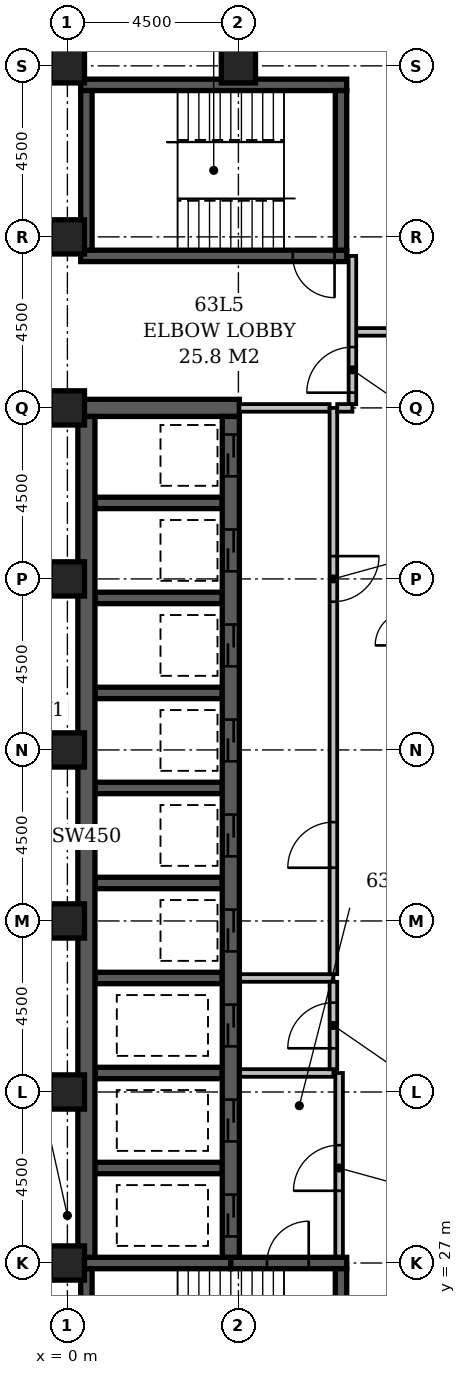
"""IFC4 building model, lengths in metres.
Left out: names, types, materials, properties, quantities, classifications, styles, units other than length and angle.
Written with IfcOpenShell. Run it as: python <this file> out.ifc"""

import sys

from ifc_helpers import new_model, si_unit, direction, frame, frame_2d, origin, origin_2d, place, context, subcontext, project, spatial, rectangle, extrude, element, fill, save


model = new_model("IFC4")
c1 = context("Model", 3, precision=1e-05, world=origin(), true_north=direction((0.0, 1.0)))
c2 = subcontext(c1, "Body", "Model", "MODEL_VIEW")
j1 = project(units=[si_unit("LENGTHUNIT", "METRE"), si_unit("PLANEANGLEUNIT", "RADIAN")], contexts=[c1])
p1 = place(None, origin())
s1 = spatial("IfcSite", under=j1, at=p1, CompositionType="ELEMENT")
p2 = place(p1, origin())
s2 = spatial("IfcBuilding", under=s1, at=p2, CompositionType="ELEMENT")
p3 = place(p2, frame((0.0, 0.0, 243.8)))
s3 = spatial("IfcBuildingStorey", under=s2, at=p3, CompositionType="ELEMENT", Elevation=243.8)
p4 = place(p3, frame((0.275, 49.5, -0.3), z_axis=(0.0, 0.0, 1.0), x_axis=(1.0, 0.0, 0.0)))
e1 = element("IfcWall", 1, at=p4, inside=s3, PredefinedType="SHEAR", context=c2, shape_type="SweptSolid", body=[
    extrude(rectangle(XDim=4.25, YDim=0.45, at=frame_2d((2.125, 0.0))), origin(), (0.0, 0.0, 1.0), 3.6),
])
p5 = place(p3, frame((0.35, 27.0, -0.3), z_axis=(0.0, 0.0, 1.0), x_axis=(1.0, 0.0, 0.0)))
e2 = element("IfcWall", 2, at=p5, inside=s3, PredefinedType="SHEAR", context=c2, shape_type="SweptSolid", body=[
    extrude(rectangle(XDim=3.95, YDim=0.3, at=frame_2d((1.975, 0.0))), origin(), (0.0, 0.0, 1.0), 3.6),
])
p6 = place(p3, frame((0.35, 53.5, -0.3), z_axis=(0.0, 0.0, 1.0), x_axis=(1.0, 0.0, 0.0)))
e3 = element("IfcWall", 3, at=p6, inside=s3, PredefinedType="SHEAR", context=c2, shape_type="SweptSolid", body=[
    extrude(rectangle(XDim=7.0, YDim=0.3, at=frame_2d((3.5, 0.0))), origin(), (0.0, 0.0, 1.0), 3.6),
])
p7 = place(p6, frame((5.58, 0.0, 0.3)))
e4 = element("IfcOpeningElement", 4, at=p7, cuts=e3, PredefinedType="OPENING", context=c2, shape_type="SweptSolid", body=[
    extrude(rectangle(XDim=1.1, YDim=2.1, at=frame_2d((0.55, 1.05))), frame((0.0, 0.162, 0.0), z_axis=(0.0, -1.0, 0.0), x_axis=(1.0, 0.0, 0.0)), (0.0, 0.0, 1.0), 0.324),
])
p8 = place(p3, frame((0.35, 58.0, -0.3), z_axis=(0.0, 0.0, 1.0), x_axis=(1.0, 0.0, 0.0)))
e5 = element("IfcWall", 5, at=p8, inside=s3, PredefinedType="SHEAR", context=c2, shape_type="SweptSolid", body=[
    extrude(rectangle(XDim=7.0, YDim=0.3, at=frame_2d((3.5, 0.0))), origin(), (0.0, 0.0, 1.0), 3.6),
])
p9 = place(p3, frame((0.5, 22.65, -0.3), z_axis=(0.0, 0.0, 1.0), x_axis=(0.0, 1.0, 0.0)))
e6 = element("IfcWall", 6, at=p9, inside=s3, PredefinedType="SHEAR", context=c2, shape_type="SweptSolid", body=[
    extrude(rectangle(XDim=4.2, YDim=0.3, at=frame_2d((2.1, 0.0))), origin(), (0.0, 0.0, 1.0), 3.6),
])
p10 = place(p3, frame((0.5, 27.15, -0.3), z_axis=(0.0, 0.0, 1.0), x_axis=(0.0, 1.0, 0.0)))
e7 = element("IfcWall", 7, at=p10, inside=s3, PredefinedType="SHEAR", context=c2, shape_type="SweptSolid", body=[
    extrude(rectangle(XDim=22.125, YDim=0.45, at=frame_2d((11.062, 0.0))), origin(), (0.0, 0.0, 1.0), 3.6),
])
p11 = place(p3, frame((0.5, 53.65, -0.3), z_axis=(0.0, 0.0, 1.0), x_axis=(0.0, 1.0, 0.0)))
e8 = element("IfcWall", 8, at=p11, inside=s3, PredefinedType="SHEAR", context=c2, shape_type="SweptSolid", body=[
    extrude(rectangle(XDim=4.2, YDim=0.3, at=frame_2d((2.1, 0.0))), origin(), (0.0, 0.0, 1.0), 3.6),
])
for number, where, z_axis, x_axis in (
    (9, (0.725, 29.5, -0.3), (0.0, 0.0, 1.0), (1.0, 0.0, 0.0)),
    (10, (0.725, 32.0, -0.3), (0.0, 0.0, 1.0), (1.0, 0.0, 0.0)),
    (11, (0.725, 34.5, -0.3), (0.0, 0.0, 1.0), (1.0, 0.0, 0.0)),
    (12, (0.725, 37.0, -0.3), (0.0, 0.0, 1.0), (1.0, 0.0, 0.0)),
    (13, (0.725, 39.5, -0.3), (0.0, 0.0, 1.0), (1.0, 0.0, 0.0)),
    (14, (0.725, 42.0, -0.3), (0.0, 0.0, 1.0), (1.0, 0.0, 0.0)),
    (15, (0.725, 44.5, -0.3), (0.0, 0.0, 1.0), (1.0, 0.0, 0.0)),
    (16, (0.725, 47.0, -0.3), (0.0, 0.0, 1.0), (1.0, 0.0, 0.0)),
):
    element("IfcWall", number, at=place(p3, frame(where, z_axis=z_axis, x_axis=x_axis)), inside=s3, PredefinedType="SHEAR", context=c2, shape_type="SweptSolid", body=[
        extrude(rectangle(XDim=3.35, YDim=0.3, at=frame_2d((1.675, 0.0))), origin(), (0.0, 0.0, 1.0), 3.6),
    ])
p12 = place(p3, frame((4.3, 27.0, -0.3), z_axis=(0.0, 0.0, 1.0), x_axis=(1.0, 0.0, 0.0)))
e17 = element("IfcWall", 17, at=p12, inside=s3, PredefinedType="SHEAR", context=c2, shape_type="SweptSolid", body=[
    extrude(rectangle(XDim=3.05, YDim=0.3, at=frame_2d((1.525, 0.0))), origin(), (0.0, 0.0, 1.0), 3.6),
])
p13 = place(p12, frame((0.95, 0.0, 0.3)))
e18 = element("IfcOpeningElement", 18, at=p13, cuts=e17, PredefinedType="OPENING", context=c2, shape_type="SweptSolid", body=[
    extrude(rectangle(XDim=1.1, YDim=2.1, at=frame_2d((0.55, 1.05))), frame((0.0, 0.162, 0.0), z_axis=(0.0, -1.0, 0.0), x_axis=(1.0, 0.0, 0.0)), (0.0, 0.0, 1.0), 0.324),
])
p14 = place(p3, frame((4.3, 27.15, -0.3), z_axis=(0.0, 0.0, 1.0), x_axis=(0.0, 1.0, 0.0)))
e19 = element("IfcWall", 19, at=p14, inside=s3, PredefinedType="SHEAR", context=c2, shape_type="SweptSolid", body=[
    extrude(rectangle(XDim=22.125, YDim=0.45, at=frame_2d((11.062, 0.0))), origin(), (0.0, 0.0, 1.0), 3.6),
])
p15 = place(p14, frame((3.05, 0.0, 0.3)))
e20 = element("IfcOpeningElement", 20, at=p15, cuts=e19, PredefinedType="OPENING", context=c2, shape_type="SweptSolid", body=[
    extrude(rectangle(XDim=1.1, YDim=2.1, at=frame_2d((0.55, 1.05))), frame((0.0, 0.237, 0.0), z_axis=(0.0, -1.0, 0.0), x_axis=(1.0, 0.0, 0.0)), (0.0, 0.0, 1.0), 0.474),
])
p16 = place(p14, frame((0.55, 0.0, 0.3)))
e21 = element("IfcOpeningElement", 21, at=p16, cuts=e19, PredefinedType="OPENING", context=c2, shape_type="SweptSolid", body=[
    extrude(rectangle(XDim=1.1, YDim=2.1, at=frame_2d((0.55, 1.05))), frame((0.0, 0.237, 0.0), z_axis=(0.0, -1.0, 0.0), x_axis=(1.0, 0.0, 0.0)), (0.0, 0.0, 1.0), 0.474),
])
p17 = place(p14, frame((20.55, 0.0, 0.3)))
e22 = element("IfcOpeningElement", 22, at=p17, cuts=e19, PredefinedType="OPENING", context=c2, shape_type="SweptSolid", body=[
    extrude(rectangle(XDim=1.1, YDim=2.1, at=frame_2d((0.55, 1.05))), frame((0.0, 0.237, 0.0), z_axis=(0.0, -1.0, 0.0), x_axis=(1.0, 0.0, 0.0)), (0.0, 0.0, 1.0), 0.474),
])
p18 = place(p14, frame((18.05, 0.0, 0.3)))
e23 = element("IfcOpeningElement", 23, at=p18, cuts=e19, PredefinedType="OPENING", context=c2, shape_type="SweptSolid", body=[
    extrude(rectangle(XDim=1.1, YDim=2.1, at=frame_2d((0.55, 1.05))), frame((0.0, 0.237, 0.0), z_axis=(0.0, -1.0, 0.0), x_axis=(1.0, 0.0, 0.0)), (0.0, 0.0, 1.0), 0.474),
])
p19 = place(p14, frame((15.55, 0.0, 0.3)))
e24 = element("IfcOpeningElement", 24, at=p19, cuts=e19, PredefinedType="OPENING", context=c2, shape_type="SweptSolid", body=[
    extrude(rectangle(XDim=1.1, YDim=2.1, at=frame_2d((0.55, 1.05))), frame((0.0, 0.237, 0.0), z_axis=(0.0, -1.0, 0.0), x_axis=(1.0, 0.0, 0.0)), (0.0, 0.0, 1.0), 0.474),
])
p20 = place(p14, frame((13.05, 0.0, 0.3)))
e25 = element("IfcOpeningElement", 25, at=p20, cuts=e19, PredefinedType="OPENING", context=c2, shape_type="SweptSolid", body=[
    extrude(rectangle(XDim=1.1, YDim=2.1, at=frame_2d((0.55, 1.05))), frame((0.0, 0.237, 0.0), z_axis=(0.0, -1.0, 0.0), x_axis=(1.0, 0.0, 0.0)), (0.0, 0.0, 1.0), 0.474),
])
p21 = place(p14, frame((10.55, 0.0, 0.3)))
e26 = element("IfcOpeningElement", 26, at=p21, cuts=e19, PredefinedType="OPENING", context=c2, shape_type="SweptSolid", body=[
    extrude(rectangle(XDim=1.1, YDim=2.1, at=frame_2d((0.55, 1.05))), frame((0.0, 0.237, 0.0), z_axis=(0.0, -1.0, 0.0), x_axis=(1.0, 0.0, 0.0)), (0.0, 0.0, 1.0), 0.474),
])
p22 = place(p14, frame((8.05, 0.0, 0.3)))
e27 = element("IfcOpeningElement", 27, at=p22, cuts=e19, PredefinedType="OPENING", context=c2, shape_type="SweptSolid", body=[
    extrude(rectangle(XDim=1.1, YDim=2.1, at=frame_2d((0.55, 1.05))), frame((0.0, 0.237, 0.0), z_axis=(0.0, -1.0, 0.0), x_axis=(1.0, 0.0, 0.0)), (0.0, 0.0, 1.0), 0.474),
])
p23 = place(p14, frame((5.55, 0.0, 0.3)))
e28 = element("IfcOpeningElement", 28, at=p23, cuts=e19, PredefinedType="OPENING", context=c2, shape_type="SweptSolid", body=[
    extrude(rectangle(XDim=1.1, YDim=2.1, at=frame_2d((0.55, 1.05))), frame((0.0, 0.237, 0.0), z_axis=(0.0, -1.0, 0.0), x_axis=(1.0, 0.0, 0.0)), (0.0, 0.0, 1.0), 0.474),
])
p24 = place(p3, frame((7.2, 22.65, -0.3), z_axis=(0.0, 0.0, 1.0), x_axis=(0.0, 1.0, 0.0)))
e29 = element("IfcWall", 29, at=p24, inside=s3, PredefinedType="SHEAR", context=c2, shape_type="SweptSolid", body=[
    extrude(rectangle(XDim=4.2, YDim=0.3, at=frame_2d((2.1, 0.0))), origin(), (0.0, 0.0, 1.0), 3.6),
])
p25 = place(p24, frame((0.8, 0.0, 0.3)))
e30 = element("IfcOpeningElement", 30, at=p25, cuts=e29, PredefinedType="OPENING", context=c2, shape_type="SweptSolid", body=[
    extrude(rectangle(XDim=1.1, YDim=2.1, at=frame_2d((0.55, 1.05))), frame((0.0, 0.162, 0.0), z_axis=(0.0, -1.0, 0.0), x_axis=(1.0, 0.0, 0.0)), (0.0, 0.0, 1.0), 0.324),
])
p26 = place(p3, frame((7.2, 53.65, -0.3), z_axis=(0.0, 0.0, 1.0), x_axis=(0.0, 1.0, 0.0)))
e31 = element("IfcWall", 31, at=p26, inside=s3, PredefinedType="SHEAR", context=c2, shape_type="SweptSolid", body=[
    extrude(rectangle(XDim=4.2, YDim=0.3, at=frame_2d((2.1, 0.0))), origin(), (0.0, 0.0, 1.0), 3.6),
])
for number, where, z_axis, x_axis in (
    (32, (0.0, 27.0, -0.3), (0.0, 0.0, 1.0), (1.0, 0.0, 0.0)),
    (33, (0.0, 31.5, -0.3), (0.0, 0.0, 1.0), (1.0, 0.0, 0.0)),
    (34, (0.0, 36.0, -0.3), (0.0, 0.0, 1.0), (1.0, 0.0, 0.0)),
    (35, (0.0, 40.5, -0.3), (0.0, 0.0, 1.0), (1.0, 0.0, 0.0)),
    (36, (0.0, 45.0, -0.3), (0.0, 0.0, 1.0), (1.0, 0.0, 0.0)),
    (37, (0.0, 49.5, -0.3), (0.0, 0.0, 1.0), (1.0, 0.0, 0.0)),
    (38, (0.0, 54.0, -0.3), (0.0, 0.0, 1.0), (1.0, 0.0, 0.0)),
    (39, (0.0, 58.5, -0.3), (0.0, 0.0, 1.0), (1.0, 0.0, 0.0)),
    (40, (4.5, 58.5, -0.3), (0.0, 0.0, 1.0), (1.0, 0.0, 0.0)),
):
    element("IfcColumn", number, at=place(p3, frame(where, z_axis=z_axis, x_axis=x_axis)), inside=s3, PredefinedType="COLUMN", context=c2, shape_type="SweptSolid", body=[
        extrude(rectangle(XDim=0.9, YDim=0.9, at=origin_2d()), origin(), (0.0, 0.0, 1.0), 3.6),
    ])
p27 = place(p3, frame((4.545, 34.5, 0.0), z_axis=(0.0, 0.0, 1.0), x_axis=(1.0, 0.0, 0.0)))
e41 = element("IfcWall", 41, at=p27, inside=s3, PredefinedType="PARTITIONING", context=c2, shape_type="SweptSolid", body=[
    extrude(rectangle(XDim=2.455, YDim=0.2, at=frame_2d((1.228, 0.0))), origin(), (0.0, 0.0, 1.0), 3.3),
])
p28 = place(p3, frame((7.0, 34.6, 0.0), z_axis=(0.0, 0.0, 1.0), x_axis=(0.0, 1.0, 0.0)))
e42 = element("IfcWall", 42, at=p28, inside=s3, PredefinedType="PARTITIONING", context=c2, shape_type="SweptSolid", body=[
    extrude(rectangle(XDim=14.9, YDim=0.2, at=frame_2d((7.45, 0.0))), origin(), (0.0, 0.0, 1.0), 3.3),
])
p29 = place(p28, frame((2.8, 0.0, 0.0)))
e43 = element("IfcOpeningElement", 43, at=p29, cuts=e42, PredefinedType="OPENING", context=c2, shape_type="SweptSolid", body=[
    extrude(rectangle(XDim=1.2, YDim=2.1, at=frame_2d((0.6, 1.05))), frame((0.0, 0.112, 0.0), z_axis=(0.0, -1.0, 0.0), x_axis=(1.0, 0.0, 0.0)), (0.0, 0.0, 1.0), 0.224),
])
p30 = place(p28, frame((9.8, 0.0, 0.0)))
e44 = element("IfcOpeningElement", 44, at=p30, cuts=e42, PredefinedType="OPENING", context=c2, shape_type="SweptSolid", body=[
    extrude(rectangle(XDim=1.2, YDim=2.1, at=frame_2d((0.6, 1.05))), frame((0.0, 0.112, 0.0), z_axis=(0.0, -1.0, 0.0), x_axis=(1.0, 0.0, 0.0)), (0.0, 0.0, 1.0), 0.224),
])
p31 = place(p3, frame((4.525, 49.5, 0.0), z_axis=(0.0, 0.0, 1.0), x_axis=(1.0, 0.0, 0.0)))
e45 = element("IfcWall", 45, at=p31, inside=s3, PredefinedType="PARTITIONING", context=c2, shape_type="SweptSolid", body=[
    extrude(rectangle(XDim=2.375, YDim=0.2, at=frame_2d((1.188, 0.0))), origin(), (0.0, 0.0, 1.0), 3.3),
])
p32 = place(p3, frame((4.545, 32.0, 0.0), z_axis=(0.0, 0.0, 1.0), x_axis=(1.0, 0.0, 0.0)))
e46 = element("IfcWall", 46, at=p32, inside=s3, PredefinedType="PARTITIONING", context=c2, shape_type="SweptSolid", body=[
    extrude(rectangle(XDim=2.455, YDim=0.2, at=frame_2d((1.228, 0.0))), origin(), (0.0, 0.0, 1.0), 3.3),
])
p33 = place(p3, frame((7.0, 32.1, 0.0), z_axis=(0.0, 0.0, 1.0), x_axis=(0.0, 1.0, 0.0)))
e47 = element("IfcWall", 47, at=p33, inside=s3, PredefinedType="PARTITIONING", context=c2, shape_type="SweptSolid", body=[
    extrude(rectangle(XDim=2.3, YDim=0.2, at=frame_2d((1.15, 0.0))), origin(), (0.0, 0.0, 1.0), 3.3),
])
p34 = place(p33, frame((0.55, 0.0, 0.0)))
e48 = element("IfcOpeningElement", 48, at=p34, cuts=e47, PredefinedType="OPENING", context=c2, shape_type="SweptSolid", body=[
    extrude(rectangle(XDim=1.2, YDim=2.1, at=frame_2d((0.6, 1.05))), frame((0.0, 0.112, 0.0), z_axis=(0.0, -1.0, 0.0), x_axis=(1.0, 0.0, 0.0)), (0.0, 0.0, 1.0), 0.224),
])
p35 = place(p3, frame((7.15, 27.17, 0.0), z_axis=(0.0, 0.0, 1.0), x_axis=(0.0, 1.0, 0.0)))
e49 = element("IfcWall", 49, at=p35, inside=s3, PredefinedType="PARTITIONING", context=c2, shape_type="SweptSolid", body=[
    extrude(rectangle(XDim=4.83, YDim=0.2, at=frame_2d((2.415, 0.0))), origin(), (0.0, 0.0, 1.0), 3.3),
])
p36 = place(p35, frame((1.73, 0.0, 0.0)))
e50 = element("IfcOpeningElement", 50, at=p36, cuts=e49, PredefinedType="OPENING", context=c2, shape_type="SweptSolid", body=[
    extrude(rectangle(XDim=1.2, YDim=2.1, at=frame_2d((0.6, 1.05))), frame((0.0, 0.112, 0.0), z_axis=(0.0, -1.0, 0.0), x_axis=(1.0, 0.0, 0.0)), (0.0, 0.0, 1.0), 0.224),
])
p37 = place(p3, frame((7.1, 49.5, 0.0), z_axis=(0.0, 0.0, 1.0), x_axis=(1.0, 0.0, 0.0)))
e51 = element("IfcWall", 51, at=p37, inside=s3, PredefinedType="PARTITIONING", context=c2, shape_type="SweptSolid", body=[
    extrude(rectangle(XDim=0.4, YDim=0.2, at=frame_2d((0.2, 0.0))), origin(), (0.0, 0.0, 1.0), 3.3),
])
p38 = place(p3, frame((7.5, 49.6, 0.0), z_axis=(0.0, 0.0, 1.0), x_axis=(0.0, 1.0, 0.0)))
e52 = element("IfcWall", 52, at=p38, inside=s3, PredefinedType="PARTITIONING", context=c2, shape_type="SweptSolid", body=[
    extrude(rectangle(XDim=3.9, YDim=0.2, at=frame_2d((1.95, 0.0))), origin(), (0.0, 0.0, 1.0), 3.3),
])
p39 = place(p38, frame((0.3, 0.0, 0.0)))
e53 = element("IfcOpeningElement", 53, at=p39, cuts=e52, PredefinedType="OPENING", context=c2, shape_type="SweptSolid", body=[
    extrude(rectangle(XDim=1.2, YDim=2.1, at=frame_2d((0.6, 1.05))), frame((0.0, 0.112, 0.0), z_axis=(0.0, -1.0, 0.0), x_axis=(1.0, 0.0, 0.0)), (0.0, 0.0, 1.0), 0.224),
])
p40 = place(p3, frame((7.6, 51.5, 0.0), z_axis=(0.0, 0.0, 1.0), x_axis=(1.0, 0.0, 0.0)))
e54 = element("IfcWall", 54, at=p40, inside=s3, PredefinedType="PARTITIONING", context=c2, shape_type="SweptSolid", body=[
    extrude(rectangle(XDim=14.65, YDim=0.2, at=frame_2d((7.325, 0.0))), origin(), (0.0, 0.0, 1.0), 3.3),
])
p41 = place(p40, frame((3.4, 0.0, 0.0)))
e55 = element("IfcOpeningElement", 55, at=p41, cuts=e54, PredefinedType="OPENING", context=c2, shape_type="SweptSolid", body=[
    extrude(rectangle(XDim=1.2, YDim=2.1, at=frame_2d((0.6, 1.05))), frame((0.0, 0.112, 0.0), z_axis=(0.0, -1.0, 0.0), x_axis=(1.0, 0.0, 0.0)), (0.0, 0.0, 1.0), 0.224),
])
p42 = place(p40, frame((10.925, 0.0, 0.0)))
e56 = element("IfcOpeningElement", 56, at=p42, cuts=e54, PredefinedType="OPENING", context=c2, shape_type="SweptSolid", body=[
    extrude(rectangle(XDim=1.0, YDim=2.1, at=frame_2d((0.5, 1.05))), frame((0.0, 0.112, 0.0), z_axis=(0.0, -1.0, 0.0), x_axis=(1.0, 0.0, 0.0)), (0.0, 0.0, 1.0), 0.224),
])
p43 = place(p39, origin())
e57 = element("IfcDoor", 57, at=p43, inside=s3, OperationType="SINGLE_SWING_LEFT", PredefinedType="DOOR", context=c2, shape_type="SweptSolid", body=[
    extrude(rectangle(XDim=1.2, YDim=2.1, at=frame_2d((0.6, 1.05))), frame((0.0, 0.025, 0.0), z_axis=(0.0, -1.0, 0.0), x_axis=(1.0, 0.0, 0.0)), (0.0, 0.0, 1.0), 0.05),
])
fill(e53, e57)
p44 = place(p36, origin())
e58 = element("IfcDoor", 58, at=p44, inside=s3, OperationType="SINGLE_SWING_LEFT", PredefinedType="DOOR", context=c2, shape_type="SweptSolid", body=[
    extrude(rectangle(XDim=1.2, YDim=2.1, at=frame_2d((0.6, 1.05))), frame((0.0, 0.025, 0.0), z_axis=(0.0, -1.0, 0.0), x_axis=(1.0, 0.0, 0.0)), (0.0, 0.0, 1.0), 0.05),
])
fill(e50, e58)
p45 = place(p15, origin())
e59 = element("IfcDoor", 59, at=p45, inside=s3, OperationType="SLIDING_TO_LEFT", PredefinedType="DOOR", context=c2, shape_type="SweptSolid", body=[
    extrude(rectangle(XDim=1.1, YDim=2.1, at=frame_2d((0.55, 1.05))), frame((0.0, 0.025, 0.0), z_axis=(0.0, -1.0, 0.0), x_axis=(1.0, 0.0, 0.0)), (0.0, 0.0, 1.0), 0.05),
])
fill(e20, e59)
p46 = place(p16, origin())
e60 = element("IfcDoor", 60, at=p46, inside=s3, OperationType="SLIDING_TO_LEFT", PredefinedType="DOOR", context=c2, shape_type="SweptSolid", body=[
    extrude(rectangle(XDim=1.1, YDim=2.1, at=frame_2d((0.55, 1.05))), frame((0.0, 0.025, 0.0), z_axis=(0.0, -1.0, 0.0), x_axis=(1.0, 0.0, 0.0)), (0.0, 0.0, 1.0), 0.05),
])
fill(e21, e60)
p47 = place(p17, origin())
e61 = element("IfcDoor", 61, at=p47, inside=s3, OperationType="SLIDING_TO_LEFT", PredefinedType="DOOR", context=c2, shape_type="SweptSolid", body=[
    extrude(rectangle(XDim=1.1, YDim=2.1, at=frame_2d((0.55, 1.05))), frame((0.0, 0.025, 0.0), z_axis=(0.0, -1.0, 0.0), x_axis=(1.0, 0.0, 0.0)), (0.0, 0.0, 1.0), 0.05),
])
fill(e22, e61)
p48 = place(p18, origin())
e62 = element("IfcDoor", 62, at=p48, inside=s3, OperationType="SLIDING_TO_LEFT", PredefinedType="DOOR", context=c2, shape_type="SweptSolid", body=[
    extrude(rectangle(XDim=1.1, YDim=2.1, at=frame_2d((0.55, 1.05))), frame((0.0, 0.025, 0.0), z_axis=(0.0, -1.0, 0.0), x_axis=(1.0, 0.0, 0.0)), (0.0, 0.0, 1.0), 0.05),
])
fill(e23, e62)
p49 = place(p19, origin())
e63 = element("IfcDoor", 63, at=p49, inside=s3, OperationType="SLIDING_TO_LEFT", PredefinedType="DOOR", context=c2, shape_type="SweptSolid", body=[
    extrude(rectangle(XDim=1.1, YDim=2.1, at=frame_2d((0.55, 1.05))), frame((0.0, 0.025, 0.0), z_axis=(0.0, -1.0, 0.0), x_axis=(1.0, 0.0, 0.0)), (0.0, 0.0, 1.0), 0.05),
])
fill(e24, e63)
p50 = place(p20, origin())
e64 = element("IfcDoor", 64, at=p50, inside=s3, OperationType="SLIDING_TO_LEFT", PredefinedType="DOOR", context=c2, shape_type="SweptSolid", body=[
    extrude(rectangle(XDim=1.1, YDim=2.1, at=frame_2d((0.55, 1.05))), frame((0.0, 0.025, 0.0), z_axis=(0.0, -1.0, 0.0), x_axis=(1.0, 0.0, 0.0)), (0.0, 0.0, 1.0), 0.05),
])
fill(e25, e64)
p51 = place(p21, origin())
e65 = element("IfcDoor", 65, at=p51, inside=s3, OperationType="SLIDING_TO_LEFT", PredefinedType="DOOR", context=c2, shape_type="SweptSolid", body=[
    extrude(rectangle(XDim=1.1, YDim=2.1, at=frame_2d((0.55, 1.05))), frame((0.0, 0.025, 0.0), z_axis=(0.0, -1.0, 0.0), x_axis=(1.0, 0.0, 0.0)), (0.0, 0.0, 1.0), 0.05),
])
fill(e26, e65)
p52 = place(p22, origin())
e66 = element("IfcDoor", 66, at=p52, inside=s3, OperationType="SLIDING_TO_LEFT", PredefinedType="DOOR", context=c2, shape_type="SweptSolid", body=[
    extrude(rectangle(XDim=1.1, YDim=2.1, at=frame_2d((0.55, 1.05))), frame((0.0, 0.025, 0.0), z_axis=(0.0, -1.0, 0.0), x_axis=(1.0, 0.0, 0.0)), (0.0, 0.0, 1.0), 0.05),
])
fill(e27, e66)
p53 = place(p29, origin())
e67 = element("IfcDoor", 67, at=p53, inside=s3, OperationType="SINGLE_SWING_LEFT", PredefinedType="DOOR", context=c2, shape_type="SweptSolid", body=[
    extrude(rectangle(XDim=1.2, YDim=2.1, at=frame_2d((0.6, 1.05))), frame((0.0, 0.025, 0.0), z_axis=(0.0, -1.0, 0.0), x_axis=(1.0, 0.0, 0.0)), (0.0, 0.0, 1.0), 0.05),
])
fill(e43, e67)
p54 = place(p30, origin())
e68 = element("IfcDoor", 68, at=p54, inside=s3, OperationType="SINGLE_SWING_RIGHT", PredefinedType="DOOR", context=c2, shape_type="SweptSolid", body=[
    extrude(rectangle(XDim=1.2, YDim=2.1, at=frame_2d((0.6, 1.05))), frame((0.0, 0.025, 0.0), z_axis=(0.0, -1.0, 0.0), x_axis=(1.0, 0.0, 0.0)), (0.0, 0.0, 1.0), 0.05),
])
fill(e44, e68)
p55 = place(p34, origin())
e69 = element("IfcDoor", 69, at=p55, inside=s3, OperationType="SINGLE_SWING_LEFT", PredefinedType="DOOR", context=c2, shape_type="SweptSolid", body=[
    extrude(rectangle(XDim=1.2, YDim=2.1, at=frame_2d((0.6, 1.05))), frame((0.0, 0.025, 0.0), z_axis=(0.0, -1.0, 0.0), x_axis=(1.0, 0.0, 0.0)), (0.0, 0.0, 1.0), 0.05),
])
fill(e48, e69)
p56 = place(p23, origin())
e70 = element("IfcDoor", 70, at=p56, inside=s3, OperationType="SLIDING_TO_LEFT", PredefinedType="DOOR", context=c2, shape_type="SweptSolid", body=[
    extrude(rectangle(XDim=1.1, YDim=2.1, at=frame_2d((0.55, 1.05))), frame((0.0, 0.025, 0.0), z_axis=(0.0, -1.0, 0.0), x_axis=(1.0, 0.0, 0.0)), (0.0, 0.0, 1.0), 0.05),
])
fill(e28, e70)
p57 = place(p13, frame((1.1, 0.0, 0.0), z_axis=(0.0, 0.0, 1.0), x_axis=(-1.0, 0.0, 0.0)))
e71 = element("IfcDoor", 71, at=p57, inside=s3, OperationType="SINGLE_SWING_LEFT", PredefinedType="DOOR", context=c2, shape_type="SweptSolid", body=[
    extrude(rectangle(XDim=1.1, YDim=2.1, at=frame_2d((0.55, 1.05))), frame((0.0, 0.025, 0.0), z_axis=(0.0, -1.0, 0.0), x_axis=(1.0, 0.0, 0.0)), (0.0, 0.0, 1.0), 0.05),
])
fill(e18, e71)
p58 = place(p7, origin())
e72 = element("IfcDoor", 72, at=p58, inside=s3, OperationType="SINGLE_SWING_RIGHT", PredefinedType="DOOR", context=c2, shape_type="SweptSolid", body=[
    extrude(rectangle(XDim=1.1, YDim=2.1, at=frame_2d((0.55, 1.05))), frame((0.0, 0.025, 0.0), z_axis=(0.0, -1.0, 0.0), x_axis=(1.0, 0.0, 0.0)), (0.0, 0.0, 1.0), 0.05),
])
fill(e4, e72)
save(model, sys.argv[1])
